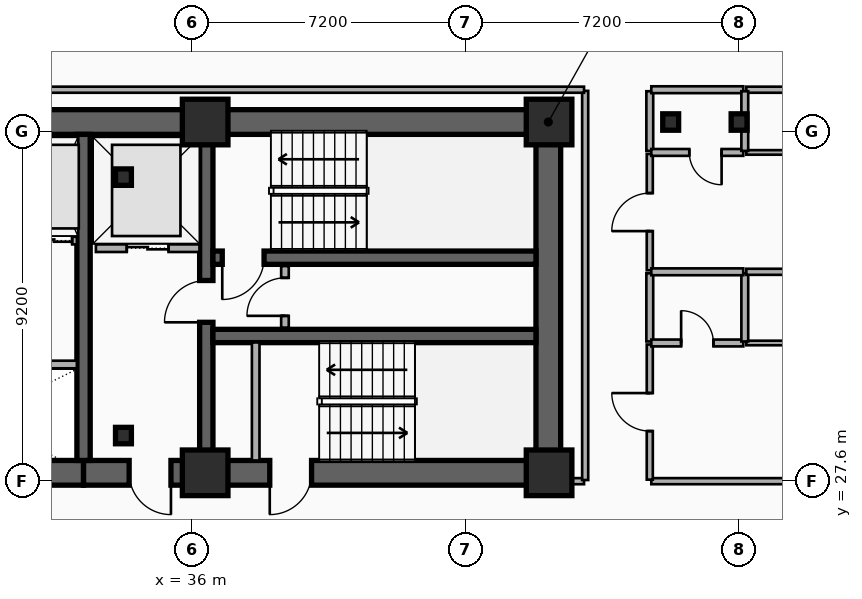
"""IFC4 building model, lengths in metres.
Left out: names, types, materials, properties, quantities, classifications, styles, units other than length and angle.
Written with IfcOpenShell. Run it as: python <this file> out.ifc"""

import sys

from ifc_helpers import new_model, si_unit, direction, frame, frame_2d, origin, origin_2d, place, context, subcontext, project, spatial, rectangle, i_section, extrude, element, fill, save


model = new_model("IFC4")
c1 = context("Model", 3, precision=1e-05, world=origin(), true_north=direction((0.0, 1.0)))
c2 = subcontext(c1, "Body", "Model", "MODEL_VIEW")
j1 = project(units=[si_unit("LENGTHUNIT", "METRE"), si_unit("PLANEANGLEUNIT", "RADIAN")], contexts=[c1])
p1 = place(None, origin())
s1 = spatial("IfcSite", under=j1, at=p1, CompositionType="ELEMENT")
p2 = place(p1, origin())
s2 = spatial("IfcBuilding", under=s1, at=p2, CompositionType="ELEMENT")
p3 = place(p2, frame((0.0, 0.0, 108.3)))
s3 = spatial("IfcBuildingStorey", under=s2, at=p3, CompositionType="ELEMENT", Elevation=108.3)
p4 = place(p3, frame((12.15, 37.05, 0.0), z_axis=(0.0, 0.0, 1.0), x_axis=(1.0, 0.0, 0.0)))
e1 = element("IfcWall", 1, at=p4, inside=s3, PredefinedType="SHEAR", context=c2, shape_type="SweptSolid", body=[
    extrude(rectangle(XDim=33.23, YDim=0.65, at=frame_2d((16.615, 0.0))), origin(), (0.0, 0.0, 1.0), 3.5),
])
p5 = place(p3, frame((33.15, 27.82, 0.0), z_axis=(0.0, 0.0, 1.0), x_axis=(-1.0, 0.0, 0.0)))
e2 = element("IfcWall", 2, at=p5, inside=s3, PredefinedType="SHEAR", context=c2, shape_type="SweptSolid", body=[
    extrude(rectangle(XDim=11.97, YDim=0.65, at=frame_2d((5.985, 0.0))), origin(), (0.0, 0.0, 1.0), 3.5),
])
p6 = place(p5, frame((6.1, 0.0, 0.0)))
e3 = element("IfcOpeningElement", 3, at=p6, cuts=e2, PredefinedType="OPENING", context=c2, shape_type="SweptSolid", body=[
    extrude(rectangle(XDim=1.6, YDim=2.2, at=frame_2d((0.8, 1.1))), frame((0.0, 0.335, 0.0), z_axis=(0.0, -1.0, 0.0), x_axis=(1.0, 0.0, 0.0)), (0.0, 0.0, 1.0), 0.67),
])
p7 = place(p3, frame((45.38, 27.82, 0.0), z_axis=(0.0, 0.0, 1.0), x_axis=(-1.0, 0.0, 0.0)))
e4 = element("IfcWall", 4, at=p7, inside=s3, PredefinedType="SHEAR", context=c2, shape_type="SweptSolid", body=[
    extrude(rectangle(XDim=12.23, YDim=0.65, at=frame_2d((6.115, 0.0))), origin(), (0.0, 0.0, 1.0), 3.5),
])
p8 = place(p7, frame((9.93, 0.0, 0.0)))
e5 = element("IfcOpeningElement", 5, at=p8, cuts=e4, PredefinedType="OPENING", context=c2, shape_type="SweptSolid", body=[
    extrude(rectangle(XDim=1.1, YDim=2.15, at=frame_2d((0.55, 1.075))), frame((0.0, 0.335, 0.0), z_axis=(0.0, -1.0, 0.0), x_axis=(1.0, 0.0, 0.0)), (0.0, 0.0, 1.0), 0.67),
])
p9 = place(p7, frame((6.23, 0.0, 0.0)))
e6 = element("IfcOpeningElement", 6, at=p9, cuts=e4, PredefinedType="OPENING", context=c2, shape_type="SweptSolid", body=[
    extrude(rectangle(XDim=1.1, YDim=2.15, at=frame_2d((0.55, 1.075))), frame((0.0, 0.335, 0.0), z_axis=(0.0, -1.0, 0.0), x_axis=(1.0, 0.0, 0.0)), (0.0, 0.0, 1.0), 0.67),
])
p10 = place(p3, frame((45.38, 28.145, 0.0), z_axis=(0.0, 0.0, 1.0), x_axis=(0.0, 1.0, 0.0)))
e7 = element("IfcWall", 7, at=p10, inside=s3, PredefinedType="SHEAR", context=c2, shape_type="SweptSolid", body=[
    extrude(rectangle(XDim=8.58, YDim=0.65, at=frame_2d((4.29, 0.0))), origin(), (0.0, 0.0, 1.0), 3.5),
])
p11 = place(p3, frame((33.15, 28.145, 0.0), z_axis=(0.0, 0.0, 1.0), x_axis=(0.0, 1.0, 0.0)))
e8 = element("IfcWall", 8, at=p11, inside=s3, PredefinedType="SHEAR", context=c2, shape_type="SweptSolid", body=[
    extrude(rectangle(XDim=8.58, YDim=0.35, at=frame_2d((4.29, 0.0))), origin(), (0.0, 0.0, 1.0), 3.5),
])
p12 = place(p3, frame((36.38, 28.145, 0.0), z_axis=(0.0, 0.0, 1.0), x_axis=(0.0, 1.0, 0.0)))
e9 = element("IfcWall", 9, at=p12, inside=s3, PredefinedType="SHEAR", context=c2, shape_type="SweptSolid", body=[
    extrude(rectangle(XDim=8.58, YDim=0.35, at=frame_2d((4.29, 0.0))), origin(), (0.0, 0.0, 1.0), 3.5),
])
p13 = place(p12, frame((3.635, 0.0, 0.0)))
e10 = element("IfcOpeningElement", 10, at=p13, cuts=e9, PredefinedType="OPENING", context=c2, shape_type="SweptSolid", body=[
    extrude(rectangle(XDim=1.1, YDim=2.15, at=frame_2d((0.55, 1.075))), frame((0.0, 0.185, 0.0), z_axis=(0.0, -1.0, 0.0), x_axis=(1.0, 0.0, 0.0)), (0.0, 0.0, 1.0), 0.37),
])
p14 = place(p3, frame((45.055, 33.48, 0.0), z_axis=(0.0, 0.0, 1.0), x_axis=(-1.0, 0.0, 0.0)))
e11 = element("IfcWall", 11, at=p14, inside=s3, PredefinedType="SHEAR", context=c2, shape_type="SweptSolid", body=[
    extrude(rectangle(XDim=8.5, YDim=0.35, at=frame_2d((4.25, 0.0))), origin(), (0.0, 0.0, 1.0), 3.5),
])
p15 = place(p14, frame((7.155, 0.0, 0.0)))
e12 = element("IfcOpeningElement", 12, at=p15, cuts=e11, PredefinedType="OPENING", context=c2, shape_type="SweptSolid", body=[
    extrude(rectangle(XDim=1.1, YDim=2.15, at=frame_2d((0.55, 1.075))), frame((0.0, 0.185, 0.0), z_axis=(0.0, -1.0, 0.0), x_axis=(1.0, 0.0, 0.0)), (0.0, 0.0, 1.0), 0.37),
])
p16 = place(p3, frame((36.555, 31.42, 0.0), z_axis=(0.0, 0.0, 1.0), x_axis=(1.0, 0.0, 0.0)))
e13 = element("IfcWall", 13, at=p16, inside=s3, PredefinedType="SHEAR", context=c2, shape_type="SweptSolid", body=[
    extrude(rectangle(XDim=8.5, YDim=0.35, at=frame_2d((4.25, 0.0))), origin(), (0.0, 0.0, 1.0), 3.5),
])
for number, where, z_axis, x_axis in (
    (14, (34.2, 28.8, 0.0), (0.0, 0.0, 1.0), (1.0, 0.0, 0.0)),
    (15, (34.2, 35.6, 0.0), (0.0, 0.0, 1.0), (1.0, 0.0, 0.0)),
):
    element("IfcColumn", number, at=place(p3, frame(where, z_axis=z_axis, x_axis=x_axis)), inside=s3, PredefinedType="COLUMN", context=c2, shape_type="SweptSolid", body=[
        extrude(i_section(OverallWidth=0.418, OverallDepth=0.432, WebThickness=0.035, FlangeThickness=0.056, FilletRadius=0.015, at=origin_2d()), origin(), (0.0, 0.0, 1.0), 3.5),
    ])
for number, where, z_axis, x_axis in (
    (16, (36.35, 27.82, 0.0), (0.0, 0.0, 1.0), (1.0, 0.0, 0.0)),
    (17, (36.35, 37.05, 0.0), (0.0, 0.0, 1.0), (1.0, 0.0, 0.0)),
    (18, (45.4, 27.82, 0.0), (0.0, 0.0, 1.0), (1.0, 0.0, 0.0)),
    (19, (45.4, 37.05, 0.0), (0.0, 0.0, 1.0), (1.0, 0.0, 0.0)),
):
    element("IfcColumn", number, at=place(p3, frame(where, z_axis=z_axis, x_axis=x_axis)), inside=s3, PredefinedType="COLUMN", context=c2, shape_type="SweptSolid", body=[
        extrude(rectangle(XDim=1.2, YDim=1.2, at=origin_2d()), origin(), (0.0, 0.0, 1.0), 3.5),
    ])
for number, where, z_axis, x_axis in (
    (20, (48.6, 37.05, 0.0), (0.0, 0.0, 1.0), (1.0, 0.0, 0.0)),
    (21, (50.4, 37.05, 0.0), (0.0, 0.0, 1.0), (1.0, 0.0, 0.0)),
):
    element("IfcColumn", number, at=place(p3, frame(where, z_axis=z_axis, x_axis=x_axis)), inside=s3, PredefinedType="COLUMN", context=c2, shape_type="SweptSolid", body=[
        extrude(i_section(OverallWidth=0.418, OverallDepth=0.432, WebThickness=0.035, FlangeThickness=0.056, FilletRadius=0.015, at=origin_2d()), origin(), (0.0, 0.0, 1.0), 3.5),
    ])
p17 = place(p3, frame((33.475, 33.73, 0.0), z_axis=(0.0, 0.0, 1.0), x_axis=(1.0, 0.0, 0.0)))
e22 = element("IfcWall", 22, at=p17, inside=s3, PredefinedType="PARTITIONING", context=c2, shape_type="SweptSolid", body=[
    extrude(rectangle(XDim=2.725, YDim=0.2, at=frame_2d((1.362, 0.0))), origin(), (0.0, 0.0, 1.0), 2.212),
])
p18 = place(p17, frame((0.812, 0.0, 0.0)))
e23 = element("IfcOpeningElement", 23, at=p18, cuts=e22, PredefinedType="OPENING", context=c2, shape_type="SweptSolid", body=[
    extrude(rectangle(XDim=1.1, YDim=2.15, at=frame_2d((0.55, 1.075))), frame((0.0, 0.11, 0.0), z_axis=(0.0, -1.0, 0.0), x_axis=(1.0, 0.0, 0.0)), (0.0, 0.0, 1.0), 0.22),
])
p19 = place(p3, frame((31.775, 30.67, 0.0), z_axis=(0.0, 0.0, 1.0), x_axis=(1.0, 0.0, 0.0)))
e24 = element("IfcWall", 24, at=p19, inside=s3, PredefinedType="PARTITIONING", context=c2, shape_type="SweptSolid", body=[
    extrude(rectangle(XDim=1.2, YDim=0.2, at=frame_2d((0.6, 0.0))), origin(), (0.0, 0.0, 1.0), 2.62),
])
p20 = place(p3, frame((31.775, 33.93, 0.0), z_axis=(0.0, 0.0, 1.0), x_axis=(1.0, 0.0, 0.0)))
e25 = element("IfcWall", 25, at=p20, inside=s3, PredefinedType="PARTITIONING", context=c2, shape_type="SweptSolid", body=[
    extrude(rectangle(XDim=1.2, YDim=0.2, at=frame_2d((0.6, 0.0))), origin(), (0.0, 0.0, 1.0), 3.24),
])
p21 = place(p20, frame((0.125, 0.0, 0.0)))
e26 = element("IfcOpeningElement", 26, at=p21, cuts=e25, PredefinedType="OPENING", context=c2, shape_type="SweptSolid", body=[
    extrude(rectangle(XDim=0.95, YDim=2.15, at=frame_2d((0.475, 1.075))), frame((0.0, 0.11, 0.0), z_axis=(0.0, -1.0, 0.0), x_axis=(1.0, 0.0, 0.0)), (0.0, 0.0, 1.0), 0.22),
])
p22 = place(p3, frame((37.68, 28.145, 0.0), z_axis=(0.0, 0.0, 1.0), x_axis=(0.0, 1.0, 0.0)))
e27 = element("IfcWall", 27, at=p22, inside=s3, PredefinedType="PARTITIONING", context=c2, shape_type="SweptSolid", body=[
    extrude(rectangle(XDim=3.105, YDim=0.2, at=frame_2d((1.552, 0.0))), origin(), (0.0, 0.0, 1.0), 2.62),
])
p23 = place(p3, frame((38.45, 31.64, 0.0), z_axis=(0.0, 0.0, 1.0), x_axis=(0.0, 1.0, 0.0)))
e28 = element("IfcWall", 28, at=p23, inside=s3, PredefinedType="PARTITIONING", context=c2, shape_type="SweptSolid", body=[
    extrude(rectangle(XDim=1.62, YDim=0.2, at=frame_2d((0.81, 0.0))), origin(), (0.0, 0.0, 1.0), 3.24),
])
p24 = place(p23, frame((0.31, 0.0, 0.0)))
e29 = element("IfcOpeningElement", 29, at=p24, cuts=e28, PredefinedType="OPENING", context=c2, shape_type="SweptSolid", body=[
    extrude(rectangle(XDim=1.0, YDim=2.15, at=frame_2d((0.5, 1.075))), frame((0.0, 0.11, 0.0), z_axis=(0.0, -1.0, 0.0), x_axis=(1.0, 0.0, 0.0)), (0.0, 0.0, 1.0), 0.22),
])
p25 = place(p3, frame((48.09, 27.6, 0.0), z_axis=(0.0, 0.0, 1.0), x_axis=(1.0, 0.0, 0.0)))
e30 = element("IfcWall", 30, at=p25, inside=s3, PredefinedType="PARTITIONING", context=c2, shape_type="SweptSolid", body=[
    extrude(rectangle(XDim=9.25, YDim=0.16, at=frame_2d((4.625, 0.0))), origin(), (0.0, 0.0, 1.0), 2.57),
])
p26 = place(p25, frame((4.125, 0.0, 0.0)))
e31 = element("IfcOpeningElement", 31, at=p26, cuts=e30, PredefinedType="OPENING", context=c2, shape_type="SweptSolid", body=[
    extrude(rectangle(XDim=1.0, YDim=2.15, at=frame_2d((0.5, 1.075))), frame((0.0, 0.09, 0.0), z_axis=(0.0, -1.0, 0.0), x_axis=(1.0, 0.0, 0.0)), (0.0, 0.0, 1.0), 0.18),
])
p27 = place(p3, frame((48.05, 27.64, 0.0), z_axis=(0.0, 0.0, 1.0), x_axis=(0.0, 1.0, 0.0)))
e32 = element("IfcWall", 32, at=p27, inside=s3, PredefinedType="PARTITIONING", context=c2, shape_type="SweptSolid", body=[
    extrude(rectangle(XDim=3.556, YDim=0.16, at=frame_2d((1.778, 0.0))), origin(), (0.0, 0.0, 1.0), 3.24),
])
p28 = place(p27, frame((1.278, 0.0, 0.0)))
e33 = element("IfcOpeningElement", 33, at=p28, cuts=e32, PredefinedType="OPENING", context=c2, shape_type="SweptSolid", body=[
    extrude(rectangle(XDim=1.0, YDim=2.15, at=frame_2d((0.5, 1.075))), frame((0.0, 0.09, 0.0), z_axis=(0.0, -1.0, 0.0), x_axis=(1.0, 0.0, 0.0)), (0.0, 0.0, 1.0), 0.18),
])
p29 = place(p3, frame((48.05, 31.276, 0.0), z_axis=(0.0, 0.0, 1.0), x_axis=(0.0, 1.0, 0.0)))
e34 = element("IfcWall", 34, at=p29, inside=s3, PredefinedType="PLUMBINGWALL", context=c2, shape_type="SweptSolid", body=[
    extrude(rectangle(XDim=1.793, YDim=0.18, at=frame_2d((0.896, 0.0))), origin(), (0.0, 0.0, 1.0), 3.24),
])
p30 = place(p3, frame((48.05, 33.149, 0.0), z_axis=(0.0, 0.0, 1.0), x_axis=(0.0, 1.0, 0.0)))
e35 = element("IfcWall", 35, at=p30, inside=s3, PredefinedType="PARTITIONING", context=c2, shape_type="SweptSolid", body=[
    extrude(rectangle(XDim=3.061, YDim=0.16, at=frame_2d((1.531, 0.0))), origin(), (0.0, 0.0, 1.0), 3.24),
])
p31 = place(p30, frame((1.031, 0.0, 0.0)))
e36 = element("IfcOpeningElement", 36, at=p31, cuts=e35, PredefinedType="OPENING", context=c2, shape_type="SweptSolid", body=[
    extrude(rectangle(XDim=1.0, YDim=2.15, at=frame_2d((0.5, 1.075))), frame((0.0, 0.09, 0.0), z_axis=(0.0, -1.0, 0.0), x_axis=(1.0, 0.0, 0.0)), (0.0, 0.0, 1.0), 0.18),
])
p32 = place(p3, frame((48.05, 36.29, 0.0), z_axis=(0.0, 0.0, 1.0), x_axis=(0.0, 1.0, 0.0)))
e37 = element("IfcWall", 37, at=p32, inside=s3, PredefinedType="PLUMBINGWALL", context=c2, shape_type="SweptSolid", body=[
    extrude(rectangle(XDim=1.57, YDim=0.18, at=frame_2d((0.785, 0.0))), origin(), (0.0, 0.0, 1.0), 2.72),
])
p33 = place(p3, frame((48.09, 37.9, 0.0), z_axis=(0.0, 0.0, 1.0), x_axis=(1.0, 0.0, 0.0)))
e38 = element("IfcWall", 38, at=p33, inside=s3, PredefinedType="PLUMBINGWALL", context=c2, shape_type="SweptSolid", body=[
    extrude(rectangle(XDim=2.42, YDim=0.18, at=frame_2d((1.21, 0.0))), origin(), (0.0, 0.0, 1.0), 3.24),
])
p34 = place(p3, frame((50.59, 37.9, 0.0), z_axis=(0.0, 0.0, 1.0), x_axis=(1.0, 0.0, 0.0)))
e39 = element("IfcWall", 39, at=p34, inside=s3, PredefinedType="PARTITIONING", context=c2, shape_type="SweptSolid", body=[
    extrude(rectangle(XDim=6.75, YDim=0.16, at=frame_2d((3.375, 0.0))), origin(), (0.0, 0.0, 1.0), 3.24),
])
p35 = place(p3, frame((48.09, 31.236, 0.0), z_axis=(0.0, 0.0, 1.0), x_axis=(1.0, 0.0, 0.0)))
e40 = element("IfcWall", 40, at=p35, inside=s3, PredefinedType="PLUMBINGWALL", context=c2, shape_type="SweptSolid", body=[
    extrude(rectangle(XDim=2.42, YDim=0.18, at=frame_2d((1.21, 0.0))), origin(), (0.0, 0.0, 1.0), 2.57),
])
p36 = place(p35, frame((0.785, 0.0, 0.0)))
e41 = element("IfcOpeningElement", 41, at=p36, cuts=e40, PredefinedType="OPENING", context=c2, shape_type="SweptSolid", body=[
    extrude(rectangle(XDim=0.85, YDim=2.1, at=frame_2d((0.425, 1.05))), frame((0.0, 0.1, 0.0), z_axis=(0.0, -1.0, 0.0), x_axis=(1.0, 0.0, 0.0)), (0.0, 0.0, 1.0), 0.2),
])
p37 = place(p3, frame((50.59, 31.236, 0.0), z_axis=(0.0, 0.0, 1.0), x_axis=(1.0, 0.0, 0.0)))
e42 = element("IfcWall", 42, at=p37, inside=s3, PredefinedType="PARTITIONING", context=c2, shape_type="SweptSolid", body=[
    extrude(rectangle(XDim=6.75, YDim=0.12, at=frame_2d((3.375, 0.0))), origin(), (0.0, 0.0, 1.0), 2.57),
])
p38 = place(p37, frame((2.925, 0.0, 0.0)))
e43 = element("IfcOpeningElement", 43, at=p38, cuts=e42, PredefinedType="OPENING", context=c2, shape_type="SweptSolid", body=[
    extrude(rectangle(XDim=0.9, YDim=2.1, at=frame_2d((0.45, 1.05))), frame((0.0, 0.07, 0.0), z_axis=(0.0, -1.0, 0.0), x_axis=(1.0, 0.0, 0.0)), (0.0, 0.0, 1.0), 0.14),
])
p39 = place(p3, frame((50.55, 31.276, 0.0), z_axis=(0.0, 0.0, 1.0), x_axis=(0.0, 1.0, 0.0)))
e44 = element("IfcWall", 44, at=p39, inside=s3, PredefinedType="PLUMBINGWALL", context=c2, shape_type="SweptSolid", body=[
    extrude(rectangle(XDim=1.793, YDim=0.18, at=frame_2d((0.896, 0.0))), origin(), (0.0, 0.0, 1.0), 2.57),
])
p40 = place(p3, frame((48.09, 33.109, 0.0), z_axis=(0.0, 0.0, 1.0), x_axis=(1.0, 0.0, 0.0)))
e45 = element("IfcWall", 45, at=p40, inside=s3, PredefinedType="PLUMBINGWALL", context=c2, shape_type="SweptSolid", body=[
    extrude(rectangle(XDim=2.42, YDim=0.18, at=frame_2d((1.21, 0.0))), origin(), (0.0, 0.0, 1.0), 2.57),
])
p41 = place(p3, frame((50.59, 33.109, 0.0), z_axis=(0.0, 0.0, 1.0), x_axis=(1.0, 0.0, 0.0)))
e46 = element("IfcWall", 46, at=p41, inside=s3, PredefinedType="PARTITIONING", context=c2, shape_type="SweptSolid", body=[
    extrude(rectangle(XDim=6.75, YDim=0.16, at=frame_2d((3.375, 0.0))), origin(), (0.0, 0.0, 1.0), 2.57),
])
p42 = place(p3, frame((50.51, 36.25, 0.0), z_axis=(0.0, 0.0, 1.0), x_axis=(-1.0, 0.0, 0.0)))
e47 = element("IfcWall", 47, at=p42, inside=s3, PredefinedType="PLUMBINGWALL", context=c2, shape_type="SweptSolid", body=[
    extrude(rectangle(XDim=2.42, YDim=0.18, at=frame_2d((1.21, 0.0))), origin(), (0.0, 0.0, 1.0), 2.57),
])
p43 = place(p42, frame((0.57, 0.0, 0.0)))
e48 = element("IfcOpeningElement", 48, at=p43, cuts=e47, PredefinedType="OPENING", context=c2, shape_type="SweptSolid", body=[
    extrude(rectangle(XDim=0.85, YDim=2.1, at=frame_2d((0.425, 1.05))), frame((0.0, 0.1, 0.0), z_axis=(0.0, -1.0, 0.0), x_axis=(1.0, 0.0, 0.0)), (0.0, 0.0, 1.0), 0.2),
])
p44 = place(p3, frame((50.59, 36.25, 0.0), z_axis=(0.0, 0.0, 1.0), x_axis=(1.0, 0.0, 0.0)))
e49 = element("IfcWall", 49, at=p44, inside=s3, PredefinedType="PARTITIONING", context=c2, shape_type="SweptSolid", body=[
    extrude(rectangle(XDim=6.75, YDim=0.12, at=frame_2d((3.375, 0.0))), origin(), (0.0, 0.0, 1.0), 2.57),
])
p45 = place(p44, frame((2.925, 0.0, 0.0)))
e50 = element("IfcOpeningElement", 50, at=p45, cuts=e49, PredefinedType="OPENING", context=c2, shape_type="SweptSolid", body=[
    extrude(rectangle(XDim=0.9, YDim=2.1, at=frame_2d((0.45, 1.05))), frame((0.0, 0.07, 0.0), z_axis=(0.0, -1.0, 0.0), x_axis=(1.0, 0.0, 0.0)), (0.0, 0.0, 1.0), 0.14),
])
p46 = place(p3, frame((50.55, 36.29, 0.0), z_axis=(0.0, 0.0, 1.0), x_axis=(0.0, 1.0, 0.0)))
e51 = element("IfcWall", 51, at=p46, inside=s3, PredefinedType="PLUMBINGWALL", context=c2, shape_type="SweptSolid", body=[
    extrude(rectangle(XDim=1.57, YDim=0.18, at=frame_2d((0.785, 0.0))), origin(), (0.0, 0.0, 1.0), 2.57),
])
p47 = place(p3, frame((45.41, 27.6, 0.0), z_axis=(0.0, 0.0, 1.0), x_axis=(1.0, 0.0, 0.0)))
e52 = element("IfcWall", 52, at=p47, inside=s3, PredefinedType="PARTITIONING", context=c2, shape_type="SweptSolid", body=[
    extrude(rectangle(XDim=0.91, YDim=0.16, at=frame_2d((0.455, 0.0))), origin(), (0.0, 0.0, 1.0), 2.28),
])
p48 = place(p3, frame((46.35, 27.63, 0.0), z_axis=(0.0, 0.0, 1.0), x_axis=(0.0, 1.0, 0.0)))
e53 = element("IfcWall", 53, at=p48, inside=s3, PredefinedType="PARTITIONING", context=c2, shape_type="SweptSolid", body=[
    extrude(rectangle(XDim=10.24, YDim=0.16, at=frame_2d((5.12, 0.0))), origin(), (0.0, 0.0, 1.0), 2.72),
])
p49 = place(p3, frame((11.28, 37.9, 0.0), z_axis=(0.0, 0.0, 1.0), x_axis=(1.0, 0.0, 0.0)))
e54 = element("IfcWall", 54, at=p49, inside=s3, PredefinedType="PARTITIONING", context=c2, shape_type="SweptSolid", body=[
    extrude(rectangle(XDim=35.04, YDim=0.16, at=frame_2d((17.52, 0.0))), origin(), (0.0, 0.0, 1.0), 3.24),
])
p50 = place(p18, origin())
e55 = element("IfcDoor", 55, at=p50, inside=s3, OperationType="DOUBLE_DOOR_SLIDING", PredefinedType="DOOR", context=c2, shape_type="SweptSolid", body=[
    extrude(rectangle(XDim=1.1, YDim=2.15, at=frame_2d((0.55, 1.075))), frame((0.0, 0.025, 0.0), z_axis=(0.0, -1.0, 0.0), x_axis=(1.0, 0.0, 0.0)), (0.0, 0.0, 1.0), 0.05),
])
fill(e23, e55)
p51 = place(p21, origin())
e56 = element("IfcDoor", 56, at=p51, inside=s3, OperationType="DOUBLE_DOOR_SLIDING", PredefinedType="DOOR", context=c2, shape_type="SweptSolid", body=[
    extrude(rectangle(XDim=0.95, YDim=2.15, at=frame_2d((0.475, 1.075))), frame((0.0, 0.025, 0.0), z_axis=(0.0, -1.0, 0.0), x_axis=(1.0, 0.0, 0.0)), (0.0, 0.0, 1.0), 0.05),
])
fill(e26, e56)
p52 = place(p15, origin())
e57 = element("IfcDoor", 57, at=p52, inside=s3, OperationType="SINGLE_SWING_RIGHT", PredefinedType="DOOR", context=c2, shape_type="SweptSolid", body=[
    extrude(rectangle(XDim=1.1, YDim=2.15, at=frame_2d((0.55, 1.075))), frame((0.0, 0.025, 0.0), z_axis=(0.0, -1.0, 0.0), x_axis=(1.0, 0.0, 0.0)), (0.0, 0.0, 1.0), 0.05),
])
fill(e12, e57)
p53 = place(p13, origin())
e58 = element("IfcDoor", 58, at=p53, inside=s3, OperationType="SINGLE_SWING_LEFT", PredefinedType="DOOR", context=c2, shape_type="SweptSolid", body=[
    extrude(rectangle(XDim=1.1, YDim=2.15, at=frame_2d((0.55, 1.075))), frame((0.0, 0.025, 0.0), z_axis=(0.0, -1.0, 0.0), x_axis=(1.0, 0.0, 0.0)), (0.0, 0.0, 1.0), 0.05),
])
fill(e10, e58)
p54 = place(p8, origin())
e59 = element("IfcDoor", 59, at=p54, inside=s3, OperationType="SINGLE_SWING_LEFT", PredefinedType="DOOR", context=c2, shape_type="SweptSolid", body=[
    extrude(rectangle(XDim=1.1, YDim=2.15, at=frame_2d((0.55, 1.075))), frame((0.0, 0.025, 0.0), z_axis=(0.0, -1.0, 0.0), x_axis=(1.0, 0.0, 0.0)), (0.0, 0.0, 1.0), 0.05),
])
fill(e5, e59)
p55 = place(p9, origin())
e60 = element("IfcDoor", 60, at=p55, inside=s3, OperationType="SINGLE_SWING_RIGHT", PredefinedType="DOOR", context=c2, shape_type="SweptSolid", body=[
    extrude(rectangle(XDim=1.1, YDim=2.15, at=frame_2d((0.55, 1.075))), frame((0.0, 0.025, 0.0), z_axis=(0.0, -1.0, 0.0), x_axis=(1.0, 0.0, 0.0)), (0.0, 0.0, 1.0), 0.05),
])
fill(e6, e60)
p56 = place(p24, origin())
e61 = element("IfcDoor", 61, at=p56, inside=s3, OperationType="SINGLE_SWING_LEFT", PredefinedType="DOOR", context=c2, shape_type="SweptSolid", body=[
    extrude(rectangle(XDim=1.0, YDim=2.15, at=frame_2d((0.5, 1.075))), frame((0.0, 0.025, 0.0), z_axis=(0.0, -1.0, 0.0), x_axis=(1.0, 0.0, 0.0)), (0.0, 0.0, 1.0), 0.05),
])
fill(e29, e61)
p57 = place(p28, origin())
e62 = element("IfcDoor", 62, at=p57, inside=s3, OperationType="SINGLE_SWING_RIGHT", PredefinedType="DOOR", context=c2, shape_type="SweptSolid", body=[
    extrude(rectangle(XDim=1.0, YDim=2.15, at=frame_2d((0.5, 1.075))), frame((0.0, 0.025, 0.0), z_axis=(0.0, -1.0, 0.0), x_axis=(1.0, 0.0, 0.0)), (0.0, 0.0, 1.0), 0.05),
])
fill(e33, e62)
p58 = place(p31, origin())
e63 = element("IfcDoor", 63, at=p58, inside=s3, OperationType="SINGLE_SWING_LEFT", PredefinedType="DOOR", context=c2, shape_type="SweptSolid", body=[
    extrude(rectangle(XDim=1.0, YDim=2.15, at=frame_2d((0.5, 1.075))), frame((0.0, 0.025, 0.0), z_axis=(0.0, -1.0, 0.0), x_axis=(1.0, 0.0, 0.0)), (0.0, 0.0, 1.0), 0.05),
])
fill(e36, e63)
p59 = place(p36, origin())
e64 = element("IfcDoor", 64, at=p59, inside=s3, OperationType="SINGLE_SWING_LEFT", PredefinedType="DOOR", context=c2, shape_type="SweptSolid", body=[
    extrude(rectangle(XDim=0.85, YDim=2.1, at=frame_2d((0.425, 1.05))), frame((0.0, 0.025, 0.0), z_axis=(0.0, -1.0, 0.0), x_axis=(1.0, 0.0, 0.0)), (0.0, 0.0, 1.0), 0.05),
])
fill(e41, e64)
p60 = place(p43, origin())
e65 = element("IfcDoor", 65, at=p60, inside=s3, OperationType="SINGLE_SWING_LEFT", PredefinedType="DOOR", context=c2, shape_type="SweptSolid", body=[
    extrude(rectangle(XDim=0.85, YDim=2.1, at=frame_2d((0.425, 1.05))), frame((0.0, 0.025, 0.0), z_axis=(0.0, -1.0, 0.0), x_axis=(1.0, 0.0, 0.0)), (0.0, 0.0, 1.0), 0.05),
])
fill(e48, e65)
save(model, sys.argv[1])
